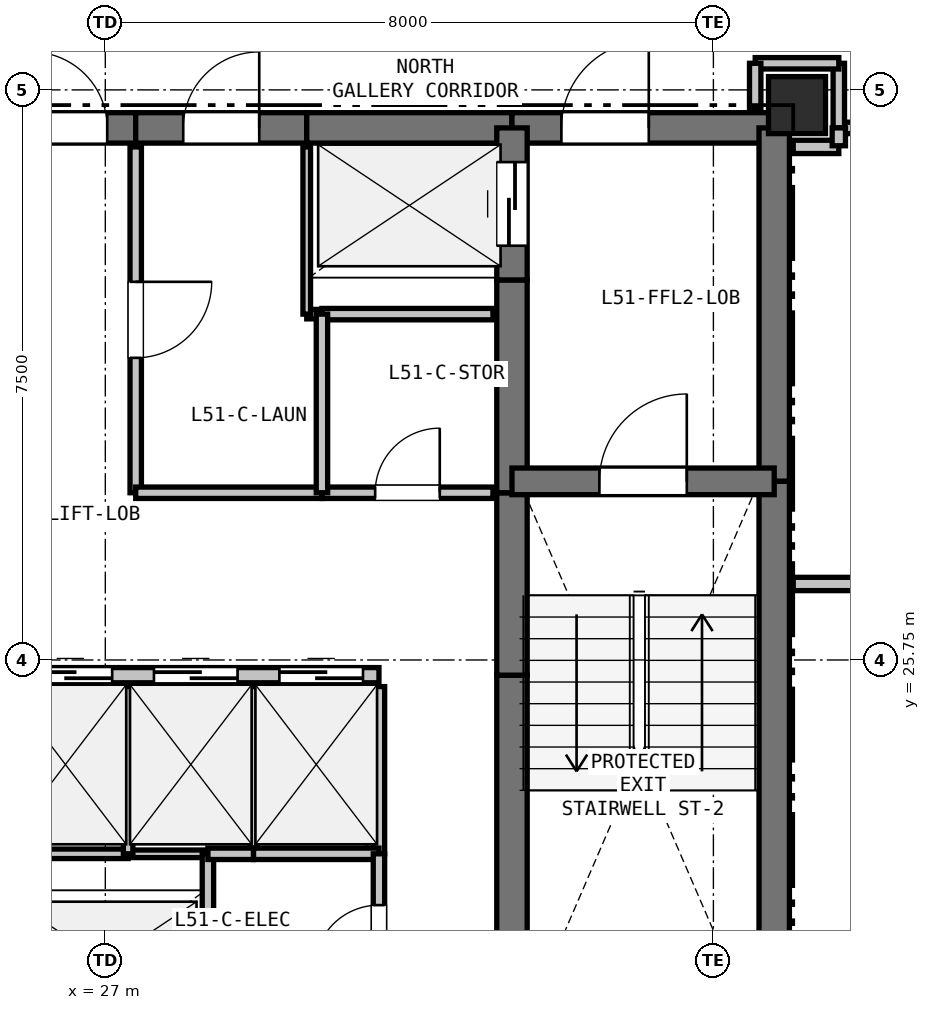
"""IFC4 building model, lengths in metres.
Left out: names, types, materials, properties, quantities, classifications, styles, units other than length and angle.
Written with IfcOpenShell. Run it as: python <this file> out.ifc"""

import sys

from ifc_helpers import new_model, si_unit, direction, frame, frame_2d, origin, origin_2d, place, context, subcontext, project, spatial, rectangle, extrude, element, fill, save


model = new_model("IFC4")
c1 = context("Model", 3, precision=1e-05, world=origin(), true_north=direction((0.0, 1.0)))
c2 = subcontext(c1, "Body", "Model", "MODEL_VIEW")
j1 = project(units=[si_unit("LENGTHUNIT", "METRE"), si_unit("PLANEANGLEUNIT", "RADIAN")], contexts=[c1])
p1 = place(None, origin())
s1 = spatial("IfcSite", under=j1, at=p1, CompositionType="ELEMENT")
p2 = place(p1, origin())
s2 = spatial("IfcBuilding", under=s1, at=p2, CompositionType="ELEMENT")
p3 = place(p2, frame((0.0, 0.0, 185.4)))
s3 = spatial("IfcBuildingStorey", under=s2, at=p3, CompositionType="ELEMENT", Elevation=185.4)
p4 = place(p3, frame((36.1, 33.05, 0.0), z_axis=(0.0, 0.0, 1.0), x_axis=(1.0, 0.0, 0.0)))
e1 = element("IfcColumn", 1, at=p4, inside=s3, PredefinedType="COLUMN", context=c2, shape_type="SweptSolid", body=[
    extrude(rectangle(XDim=0.75, YDim=0.75, at=origin_2d()), origin(), (0.0, 0.0, 1.0), 3.3),
])
p5 = place(p3, frame((25.65, 32.75, 0.0), z_axis=(0.0, 0.0, 1.0), x_axis=(1.0, 0.0, 0.0)))
e2 = element("IfcWall", 2, at=p5, inside=s3, PredefinedType="SHEAR", context=c2, shape_type="SweptSolid", body=[
    extrude(rectangle(XDim=1.75, YDim=0.4, at=frame_2d((0.875, 0.0))), origin(), (0.0, 0.0, 1.0), 3.07),
])
p6 = place(p5, frame((0.375, 0.0, 0.0)))
e3 = element("IfcOpeningElement", 3, at=p6, cuts=e2, PredefinedType="OPENING", context=c2, shape_type="SweptSolid", body=[
    extrude(rectangle(XDim=1.0, YDim=2.15, at=frame_2d((0.5, 1.075))), frame((0.0, 0.21, 0.0), z_axis=(0.0, -1.0, 0.0), x_axis=(1.0, 0.0, 0.0)), (0.0, 0.0, 1.0), 0.42),
])
p7 = place(p3, frame((27.4, 32.75, 0.0), z_axis=(0.0, 0.0, 1.0), x_axis=(1.0, 0.0, 0.0)))
e4 = element("IfcWall", 4, at=p7, inside=s3, PredefinedType="SHEAR", context=c2, shape_type="SweptSolid", body=[
    extrude(rectangle(XDim=2.25, YDim=0.4, at=frame_2d((1.125, 0.0))), origin(), (0.0, 0.0, 1.0), 3.07),
])
p8 = place(p7, frame((0.625, 0.0, 0.0)))
e5 = element("IfcOpeningElement", 5, at=p8, cuts=e4, PredefinedType="OPENING", context=c2, shape_type="SweptSolid", body=[
    extrude(rectangle(XDim=1.0, YDim=2.15, at=frame_2d((0.5, 1.075))), frame((0.0, 0.21, 0.0), z_axis=(0.0, -1.0, 0.0), x_axis=(1.0, 0.0, 0.0)), (0.0, 0.0, 1.0), 0.42),
])
p9 = place(p3, frame((29.65, 32.75, 0.0), z_axis=(0.0, 0.0, 1.0), x_axis=(1.0, 0.0, 0.0)))
e6 = element("IfcWall", 6, at=p9, inside=s3, PredefinedType="SHEAR", context=c2, shape_type="SweptSolid", body=[
    extrude(rectangle(XDim=2.7, YDim=0.4, at=frame_2d((1.35, 0.0))), origin(), (0.0, 0.0, 1.0), 3.07),
])
p10 = place(p3, frame((32.35, 32.75, 0.0), z_axis=(0.0, 0.0, 1.0), x_axis=(1.0, 0.0, 0.0)))
e7 = element("IfcWall", 7, at=p10, inside=s3, PredefinedType="SHEAR", context=c2, shape_type="SweptSolid", body=[
    extrude(rectangle(XDim=3.45, YDim=0.4, at=frame_2d((1.725, 0.0))), origin(), (0.0, 0.0, 1.0), 3.07),
])
p11 = place(p10, frame((0.65, 0.0, 0.0)))
e8 = element("IfcOpeningElement", 8, at=p11, cuts=e7, PredefinedType="OPENING", context=c2, shape_type="SweptSolid", body=[
    extrude(rectangle(XDim=1.15, YDim=2.15, at=frame_2d((0.575, 1.075))), frame((0.0, 0.21, 0.0), z_axis=(0.0, -1.0, 0.0), x_axis=(1.0, 0.0, 0.0)), (0.0, 0.0, 1.0), 0.42),
])
p12 = place(p3, frame((35.8, 32.75, 0.0), z_axis=(0.0, 0.0, 1.0), x_axis=(0.0, -1.0, 0.0)))
e9 = element("IfcWall", 9, at=p12, inside=s3, PredefinedType="SHEAR", context=c2, shape_type="SweptSolid", body=[
    extrude(rectangle(XDim=4.65, YDim=0.4, at=frame_2d((2.325, 0.0))), origin(), (0.0, 0.0, 1.0), 3.07),
])
p13 = place(p3, frame((35.8, 28.1, 0.0), z_axis=(0.0, 0.0, 1.0), x_axis=(0.0, -1.0, 0.0)))
e10 = element("IfcWall", 10, at=p13, inside=s3, PredefinedType="SHEAR", context=c2, shape_type="SweptSolid", body=[
    extrude(rectangle(XDim=7.35, YDim=0.4, at=frame_2d((3.675, 0.0))), origin(), (0.0, 0.0, 1.0), 3.07),
])
p14 = place(p3, frame((32.35, 20.75, 0.0), z_axis=(0.0, 0.0, 1.0), x_axis=(0.0, 1.0, 0.0)))
e11 = element("IfcWall", 11, at=p14, inside=s3, PredefinedType="SHEAR", context=c2, shape_type="SweptSolid", body=[
    extrude(rectangle(XDim=4.8, YDim=0.4, at=frame_2d((2.4, 0.0))), origin(), (0.0, 0.0, 1.0), 3.07),
])
p15 = place(p3, frame((32.35, 25.55, 0.0), z_axis=(0.0, 0.0, 1.0), x_axis=(0.0, 1.0, 0.0)))
e12 = element("IfcWall", 12, at=p15, inside=s3, PredefinedType="SHEAR", context=c2, shape_type="SweptSolid", body=[
    extrude(rectangle(XDim=2.4, YDim=0.4, at=frame_2d((1.2, 0.0))), origin(), (0.0, 0.0, 1.0), 3.07),
])
p16 = place(p3, frame((32.35, 27.95, 0.0), z_axis=(0.0, 0.0, 1.0), x_axis=(0.0, 1.0, 0.0)))
e13 = element("IfcWall", 13, at=p16, inside=s3, PredefinedType="SHEAR", context=c2, shape_type="SweptSolid", body=[
    extrude(rectangle(XDim=2.8, YDim=0.4, at=frame_2d((1.4, 0.0))), origin(), (0.0, 0.0, 1.0), 3.07),
])
p17 = place(p3, frame((32.35, 30.75, 0.0), z_axis=(0.0, 0.0, 1.0), x_axis=(0.0, 1.0, 0.0)))
e14 = element("IfcWall", 14, at=p17, inside=s3, PredefinedType="SHEAR", context=c2, shape_type="SweptSolid", body=[
    extrude(rectangle(XDim=2.0, YDim=0.4, at=frame_2d((1.0, 0.0))), origin(), (0.0, 0.0, 1.0), 3.07),
])
p18 = place(p17, frame((0.45, 0.0, 0.0)))
e15 = element("IfcOpeningElement", 15, at=p18, cuts=e14, PredefinedType="OPENING", context=c2, shape_type="SweptSolid", body=[
    extrude(rectangle(XDim=1.1, YDim=2.15, at=frame_2d((0.55, 1.075))), frame((0.0, 0.21, 0.0), z_axis=(0.0, -1.0, 0.0), x_axis=(1.0, 0.0, 0.0)), (0.0, 0.0, 1.0), 0.42),
])
p19 = place(p3, frame((32.35, 28.1, 0.0), z_axis=(0.0, 0.0, 1.0), x_axis=(1.0, 0.0, 0.0)))
e16 = element("IfcWall", 16, at=p19, inside=s3, PredefinedType="SHEAR", context=c2, shape_type="SweptSolid", body=[
    extrude(rectangle(XDim=3.45, YDim=0.35, at=frame_2d((1.725, 0.0))), origin(), (0.0, 0.0, 1.0), 3.07),
])
p20 = place(p19, frame((1.15, 0.0, 0.0)))
e17 = element("IfcOpeningElement", 17, at=p20, cuts=e16, PredefinedType="OPENING", context=c2, shape_type="SweptSolid", body=[
    extrude(rectangle(XDim=1.15, YDim=2.15, at=frame_2d((0.575, 1.075))), frame((0.0, 0.185, 0.0), z_axis=(0.0, -1.0, 0.0), x_axis=(1.0, 0.0, 0.0)), (0.0, 0.0, 1.0), 0.37),
])
p21 = place(p3, frame((25.65, 25.55, 0.0), z_axis=(0.0, 0.0, 1.0), x_axis=(1.0, 0.0, 0.0)))
e18 = element("IfcWall", 18, at=p21, inside=s3, PredefinedType="PARTITIONING", context=c2, shape_type="SweptSolid", body=[
    extrude(rectangle(XDim=4.95, YDim=0.2, at=frame_2d((2.475, 0.0))), origin(), (0.0, 0.0, 1.0), 3.07),
])
p22 = place(p21, frame((0.34, 0.0, 0.0)))
e19 = element("IfcOpeningElement", 19, at=p22, cuts=e18, PredefinedType="OPENING", context=c2, shape_type="SweptSolid", body=[
    extrude(rectangle(XDim=1.1, YDim=2.15, at=frame_2d((0.55, 1.075))), frame((0.0, 0.11, 0.0), z_axis=(0.0, -1.0, 0.0), x_axis=(1.0, 0.0, 0.0)), (0.0, 0.0, 1.0), 0.22),
])
p23 = place(p21, frame((1.99, 0.0, 0.0)))
e20 = element("IfcOpeningElement", 20, at=p23, cuts=e18, PredefinedType="OPENING", context=c2, shape_type="SweptSolid", body=[
    extrude(rectangle(XDim=1.1, YDim=2.15, at=frame_2d((0.55, 1.075))), frame((0.0, 0.11, 0.0), z_axis=(0.0, -1.0, 0.0), x_axis=(1.0, 0.0, 0.0)), (0.0, 0.0, 1.0), 0.22),
])
p24 = place(p21, frame((3.64, 0.0, 0.0)))
e21 = element("IfcOpeningElement", 21, at=p24, cuts=e18, PredefinedType="OPENING", context=c2, shape_type="SweptSolid", body=[
    extrude(rectangle(XDim=1.1, YDim=2.15, at=frame_2d((0.55, 1.075))), frame((0.0, 0.11, 0.0), z_axis=(0.0, -1.0, 0.0), x_axis=(1.0, 0.0, 0.0)), (0.0, 0.0, 1.0), 0.22),
])
p25 = place(p3, frame((25.9, 23.2, 0.0), z_axis=(0.0, 0.0, 1.0), x_axis=(1.0, 0.0, 0.0)))
e22 = element("IfcWall", 22, at=p25, inside=s3, PredefinedType="PARTITIONING", context=c2, shape_type="SweptSolid", body=[
    extrude(rectangle(XDim=1.4, YDim=0.125, at=frame_2d((0.7, 0.0))), origin(), (0.0, 0.0, 1.0), 3.07),
])
p26 = place(p3, frame((27.3, 23.2, 0.0), z_axis=(0.0, 0.0, 1.0), x_axis=(1.0, 0.0, 0.0)))
e23 = element("IfcWall", 23, at=p26, inside=s3, PredefinedType="PARTITIONING", context=c2, shape_type="SweptSolid", body=[
    extrude(rectangle(XDim=1.05, YDim=0.1, at=frame_2d((0.525, 0.0))), origin(), (0.0, 0.0, 1.0), 3.07),
])
p27 = place(p3, frame((28.35, 23.2, 0.0), z_axis=(0.0, 0.0, 1.0), x_axis=(0.0, -1.0, 0.0)))
e24 = element("IfcWall", 24, at=p27, inside=s3, PredefinedType="PARTITIONING", context=c2, shape_type="SweptSolid", body=[
    extrude(rectangle(XDim=2.2, YDim=0.15, at=frame_2d((1.1, 0.0))), origin(), (0.0, 0.0, 1.0), 3.07),
])
p28 = place(p3, frame((32.1, 30.3, 0.0), z_axis=(0.0, 0.0, 1.0), x_axis=(-1.0, 0.0, 0.0)))
e25 = element("IfcWall", 25, at=p28, inside=s3, PredefinedType="PARTITIONING", context=c2, shape_type="SweptSolid", body=[
    extrude(rectangle(XDim=2.25, YDim=0.15, at=frame_2d((1.125, 0.0))), origin(), (0.0, 0.0, 1.0), 3.07),
])
p29 = place(p3, frame((29.85, 30.3, 0.0), z_axis=(0.0, 0.0, 1.0), x_axis=(-1.0, 0.0, 0.0)))
e26 = element("IfcWall", 26, at=p29, inside=s3, PredefinedType="PARTITIONING", context=c2, shape_type="SweptSolid", body=[
    extrude(rectangle(XDim=0.2, YDim=0.125, at=frame_2d((0.1, 0.0))), origin(), (0.0, 0.0, 1.0), 3.07),
])
p30 = place(p3, frame((29.65, 30.3, 0.0), z_axis=(0.0, 0.0, 1.0), x_axis=(0.0, 1.0, 0.0)))
e27 = element("IfcWall", 27, at=p30, inside=s3, PredefinedType="PARTITIONING", context=c2, shape_type="SweptSolid", body=[
    extrude(rectangle(XDim=2.2, YDim=0.1, at=frame_2d((1.1, 0.0))), origin(), (0.0, 0.0, 1.0), 3.07),
])
p31 = place(p3, frame((27.3, 25.4, 0.0), z_axis=(0.0, 0.0, 1.0), x_axis=(0.0, -1.0, 0.0)))
e28 = element("IfcWall", 28, at=p31, inside=s3, PredefinedType="PARTITIONING", context=c2, shape_type="SweptSolid", body=[
    extrude(rectangle(XDim=2.2, YDim=0.125, at=frame_2d((1.1, 0.0))), origin(), (0.0, 0.0, 1.0), 3.07),
])
p32 = place(p3, frame((28.95, 25.4, 0.0), z_axis=(0.0, 0.0, 1.0), x_axis=(0.0, -1.0, 0.0)))
e29 = element("IfcWall", 29, at=p32, inside=s3, PredefinedType="PARTITIONING", context=c2, shape_type="SweptSolid", body=[
    extrude(rectangle(XDim=2.2, YDim=0.1, at=frame_2d((1.1, 0.0))), origin(), (0.0, 0.0, 1.0), 3.07),
])
p33 = place(p3, frame((28.95, 23.2, 0.0), z_axis=(0.0, 0.0, 1.0), x_axis=(-1.0, 0.0, 0.0)))
e30 = element("IfcWall", 30, at=p33, inside=s3, PredefinedType="PARTITIONING", context=c2, shape_type="SweptSolid", body=[
    extrude(rectangle(XDim=0.6, YDim=0.15, at=frame_2d((0.3, 0.0))), origin(), (0.0, 0.0, 1.0), 3.07),
])
p34 = place(p3, frame((30.6, 25.4, 0.0), z_axis=(0.0, 0.0, 1.0), x_axis=(0.0, -1.0, 0.0)))
e31 = element("IfcWall", 31, at=p34, inside=s3, PredefinedType="PARTITIONING", context=c2, shape_type="SweptSolid", body=[
    extrude(rectangle(XDim=2.2, YDim=0.15, at=frame_2d((1.1, 0.0))), origin(), (0.0, 0.0, 1.0), 3.07),
])
p35 = place(p3, frame((30.6, 23.2, 0.0), z_axis=(0.0, 0.0, 1.0), x_axis=(-1.0, 0.0, 0.0)))
e32 = element("IfcWall", 32, at=p35, inside=s3, PredefinedType="PARTITIONING", context=c2, shape_type="SweptSolid", body=[
    extrude(rectangle(XDim=1.65, YDim=0.15, at=frame_2d((0.825, 0.0))), origin(), (0.0, 0.0, 1.0), 3.07),
])
p36 = place(p3, frame((30.6, 21.0, 0.0), z_axis=(0.0, 0.0, 1.0), x_axis=(0.0, 1.0, 0.0)))
e33 = element("IfcWall", 33, at=p36, inside=s3, PredefinedType="PARTITIONING", context=c2, shape_type="SweptSolid", body=[
    extrude(rectangle(XDim=2.2, YDim=0.15, at=frame_2d((1.1, 0.0))), origin(), (0.0, 0.0, 1.0), 3.07),
])
p37 = place(p36, frame((0.675, 0.0, 0.0)))
e34 = element("IfcOpeningElement", 34, at=p37, cuts=e33, PredefinedType="OPENING", context=c2, shape_type="SweptSolid", body=[
    extrude(rectangle(XDim=0.85, YDim=2.1, at=frame_2d((0.425, 1.05))), frame((0.0, 0.085, 0.0), z_axis=(0.0, -1.0, 0.0), x_axis=(1.0, 0.0, 0.0)), (0.0, 0.0, 1.0), 0.17),
])
p38 = place(p3, frame((27.4, 32.5, 0.0), z_axis=(0.0, 0.0, 1.0), x_axis=(0.0, -1.0, 0.0)))
e35 = element("IfcWall", 35, at=p38, inside=s3, PredefinedType="PARTITIONING", context=c2, shape_type="SweptSolid", body=[
    extrude(rectangle(XDim=4.55, YDim=0.15, at=frame_2d((2.275, 0.0))), origin(), (0.0, 0.0, 1.0), 3.07),
])
p39 = place(p38, frame((1.775, 0.0, 0.0)))
e36 = element("IfcOpeningElement", 36, at=p39, cuts=e35, PredefinedType="OPENING", context=c2, shape_type="SweptSolid", body=[
    extrude(rectangle(XDim=1.0, YDim=2.15, at=frame_2d((0.5, 1.075))), frame((0.0, 0.085, 0.0), z_axis=(0.0, -1.0, 0.0), x_axis=(1.0, 0.0, 0.0)), (0.0, 0.0, 1.0), 0.17),
])
p40 = place(p3, frame((27.4, 27.95, 0.0), z_axis=(0.0, 0.0, 1.0), x_axis=(1.0, 0.0, 0.0)))
e37 = element("IfcWall", 37, at=p40, inside=s3, PredefinedType="PARTITIONING", context=c2, shape_type="SweptSolid", body=[
    extrude(rectangle(XDim=2.45, YDim=0.15, at=frame_2d((1.225, 0.0))), origin(), (0.0, 0.0, 1.0), 3.07),
])
p41 = place(p3, frame((29.85, 27.95, 0.0), z_axis=(0.0, 0.0, 1.0), x_axis=(1.0, 0.0, 0.0)))
e38 = element("IfcWall", 38, at=p41, inside=s3, PredefinedType="PARTITIONING", context=c2, shape_type="SweptSolid", body=[
    extrude(rectangle(XDim=2.25, YDim=0.15, at=frame_2d((1.125, 0.0))), origin(), (0.0, 0.0, 1.0), 3.07),
])
p42 = place(p41, frame((0.7, 0.0, 0.0)))
e39 = element("IfcOpeningElement", 39, at=p42, cuts=e38, PredefinedType="OPENING", context=c2, shape_type="SweptSolid", body=[
    extrude(rectangle(XDim=0.85, YDim=2.1, at=frame_2d((0.425, 1.05))), frame((0.0, 0.085, 0.0), z_axis=(0.0, -1.0, 0.0), x_axis=(1.0, 0.0, 0.0)), (0.0, 0.0, 1.0), 0.17),
])
p43 = place(p3, frame((39.2, 32.75, 0.0), z_axis=(0.0, 0.0, 1.0), x_axis=(-1.0, 0.0, 0.0)))
e40 = element("IfcWall", 40, at=p43, inside=s3, PredefinedType="PARTITIONING", context=c2, shape_type="SweptSolid", body=[
    extrude(rectangle(XDim=2.55, YDim=0.15, at=frame_2d((1.275, 0.0))), origin(), (0.0, 0.0, 1.0), 3.07),
])
p44 = place(p43, frame((0.85, 0.0, 0.0)))
e41 = element("IfcOpeningElement", 41, at=p44, cuts=e40, PredefinedType="OPENING", context=c2, shape_type="SweptSolid", body=[
    extrude(rectangle(XDim=0.85, YDim=2.1, at=frame_2d((0.425, 1.05))), frame((0.0, 0.085, 0.0), z_axis=(0.0, -1.0, 0.0), x_axis=(1.0, 0.0, 0.0)), (0.0, 0.0, 1.0), 0.17),
])
p45 = place(p3, frame((36.65, 32.75, 0.0), z_axis=(0.0, 0.0, 1.0), x_axis=(0.0, 1.0, 0.0)))
e42 = element("IfcWall", 42, at=p45, inside=s3, PredefinedType="PARTITIONING", context=c2, shape_type="SweptSolid", body=[
    extrude(rectangle(XDim=0.85, YDim=0.15, at=frame_2d((0.425, 0.0))), origin(), (0.0, 0.0, 1.0), 2.518),
])
p46 = place(p3, frame((36.65, 33.6, 0.0), z_axis=(0.0, 0.0, 1.0), x_axis=(-1.0, 0.0, 0.0)))
e43 = element("IfcWall", 43, at=p46, inside=s3, PredefinedType="PARTITIONING", context=c2, shape_type="SweptSolid", body=[
    extrude(rectangle(XDim=1.1, YDim=0.15, at=frame_2d((0.55, 0.0))), origin(), (0.0, 0.0, 1.0), 2.518),
])
p47 = place(p3, frame((35.55, 33.6, 0.0), z_axis=(0.0, 0.0, 1.0), x_axis=(0.0, -1.0, 0.0)))
e44 = element("IfcWall", 44, at=p47, inside=s3, PredefinedType="PARTITIONING", context=c2, shape_type="SweptSolid", body=[
    extrude(rectangle(XDim=0.6, YDim=0.15, at=frame_2d((0.3, 0.0))), origin(), (0.0, 0.0, 1.0), 2.595),
])
p48 = place(p3, frame((36.05, 32.5, 0.0), z_axis=(0.0, 0.0, 1.0), x_axis=(1.0, 0.0, 0.0)))
e45 = element("IfcWall", 45, at=p48, inside=s3, PredefinedType="PLUMBINGWALL", context=c2, shape_type="SweptSolid", body=[
    extrude(rectangle(XDim=0.6, YDim=0.175, at=frame_2d((0.3, 0.0))), origin(), (0.0, 0.0, 1.0), 2.595),
])
p49 = place(p3, frame((36.65, 32.515, 0.0), z_axis=(0.0, 0.0, 1.0), x_axis=(0.0, 1.0, 0.0)))
e46 = element("IfcWall", 46, at=p49, inside=s3, PredefinedType="PLUMBINGWALL", context=c2, shape_type="SweptSolid", body=[
    extrude(rectangle(XDim=0.235, YDim=0.175, at=frame_2d((0.118, 0.0))), origin(), (0.0, 0.0, 1.0), 3.07),
])
p50 = place(p3, frame((40.55, 26.75, 0.0), z_axis=(0.0, 0.0, 1.0), x_axis=(-1.0, 0.0, 0.0)))
e47 = element("IfcWall", 47, at=p50, inside=s3, PredefinedType="PLUMBINGWALL", context=c2, shape_type="SweptSolid", body=[
    extrude(rectangle(XDim=4.5, YDim=0.175, at=frame_2d((2.25, 0.0))), origin(), (0.0, 0.0, 1.0), 2.365),
])
p51 = place(p3, frame((29.85, 30.3, 0.0), z_axis=(0.0, 0.0, 1.0), x_axis=(0.0, -1.0, 0.0)))
e48 = element("IfcWall", 48, at=p51, inside=s3, PredefinedType="PARTITIONING", context=c2, shape_type="SweptSolid", body=[
    extrude(rectangle(XDim=2.35, YDim=0.15, at=frame_2d((1.175, 0.0))), origin(), (0.0, 0.0, 1.0), 3.07),
])
p52 = place(p22, origin())
e49 = element("IfcDoor", 49, at=p52, inside=s3, OperationType="SLIDING_TO_LEFT", PredefinedType="DOOR", context=c2, shape_type="SweptSolid", body=[
    extrude(rectangle(XDim=1.1, YDim=2.15, at=frame_2d((0.55, 1.075))), frame((0.0, 0.025, 0.0), z_axis=(0.0, -1.0, 0.0), x_axis=(1.0, 0.0, 0.0)), (0.0, 0.0, 1.0), 0.05),
])
fill(e19, e49)
p53 = place(p23, origin())
e50 = element("IfcDoor", 50, at=p53, inside=s3, OperationType="SLIDING_TO_LEFT", PredefinedType="DOOR", context=c2, shape_type="SweptSolid", body=[
    extrude(rectangle(XDim=1.1, YDim=2.15, at=frame_2d((0.55, 1.075))), frame((0.0, 0.025, 0.0), z_axis=(0.0, -1.0, 0.0), x_axis=(1.0, 0.0, 0.0)), (0.0, 0.0, 1.0), 0.05),
])
fill(e20, e50)
p54 = place(p24, origin())
e51 = element("IfcDoor", 51, at=p54, inside=s3, OperationType="SLIDING_TO_LEFT", PredefinedType="DOOR", context=c2, shape_type="SweptSolid", body=[
    extrude(rectangle(XDim=1.1, YDim=2.15, at=frame_2d((0.55, 1.075))), frame((0.0, 0.025, 0.0), z_axis=(0.0, -1.0, 0.0), x_axis=(1.0, 0.0, 0.0)), (0.0, 0.0, 1.0), 0.05),
])
fill(e21, e51)
p55 = place(p6, origin())
e52 = element("IfcDoor", 52, at=p55, inside=s3, OperationType="SINGLE_SWING_LEFT", PredefinedType="DOOR", context=c2, shape_type="SweptSolid", body=[
    extrude(rectangle(XDim=1.0, YDim=2.15, at=frame_2d((0.5, 1.075))), frame((0.0, 0.025, 0.0), z_axis=(0.0, -1.0, 0.0), x_axis=(1.0, 0.0, 0.0)), (0.0, 0.0, 1.0), 0.05),
])
fill(e3, e52)
p56 = place(p18, origin())
e53 = element("IfcDoor", 53, at=p56, inside=s3, OperationType="SLIDING_TO_LEFT", PredefinedType="DOOR", context=c2, shape_type="SweptSolid", body=[
    extrude(rectangle(XDim=1.1, YDim=2.15, at=frame_2d((0.55, 1.075))), frame((0.0, 0.025, 0.0), z_axis=(0.0, -1.0, 0.0), x_axis=(1.0, 0.0, 0.0)), (0.0, 0.0, 1.0), 0.05),
])
fill(e15, e53)
p57 = place(p20, origin())
e54 = element("IfcDoor", 54, at=p57, inside=s3, OperationType="SINGLE_SWING_RIGHT", PredefinedType="DOOR", context=c2, shape_type="SweptSolid", body=[
    extrude(rectangle(XDim=1.15, YDim=2.15, at=frame_2d((0.575, 1.075))), frame((0.0, 0.025, 0.0), z_axis=(0.0, -1.0, 0.0), x_axis=(1.0, 0.0, 0.0)), (0.0, 0.0, 1.0), 0.05),
])
fill(e17, e54)
p58 = place(p11, origin())
e55 = element("IfcDoor", 55, at=p58, inside=s3, OperationType="SINGLE_SWING_RIGHT", PredefinedType="DOOR", context=c2, shape_type="SweptSolid", body=[
    extrude(rectangle(XDim=1.15, YDim=2.15, at=frame_2d((0.575, 1.075))), frame((0.0, 0.025, 0.0), z_axis=(0.0, -1.0, 0.0), x_axis=(1.0, 0.0, 0.0)), (0.0, 0.0, 1.0), 0.05),
])
fill(e8, e55)
p59 = place(p39, origin())
e56 = element("IfcDoor", 56, at=p59, inside=s3, OperationType="SINGLE_SWING_LEFT", PredefinedType="DOOR", context=c2, shape_type="SweptSolid", body=[
    extrude(rectangle(XDim=1.0, YDim=2.15, at=frame_2d((0.5, 1.075))), frame((0.0, 0.025, 0.0), z_axis=(0.0, -1.0, 0.0), x_axis=(1.0, 0.0, 0.0)), (0.0, 0.0, 1.0), 0.05),
])
fill(e36, e56)
p60 = place(p42, origin())
e57 = element("IfcDoor", 57, at=p60, inside=s3, OperationType="SINGLE_SWING_RIGHT", PredefinedType="DOOR", context=c2, shape_type="SweptSolid", body=[
    extrude(rectangle(XDim=0.85, YDim=2.1, at=frame_2d((0.425, 1.05))), frame((0.0, 0.025, 0.0), z_axis=(0.0, -1.0, 0.0), x_axis=(1.0, 0.0, 0.0)), (0.0, 0.0, 1.0), 0.05),
])
fill(e39, e57)
p61 = place(p37, origin())
e58 = element("IfcDoor", 58, at=p61, inside=s3, OperationType="SINGLE_SWING_LEFT", PredefinedType="DOOR", context=c2, shape_type="SweptSolid", body=[
    extrude(rectangle(XDim=0.85, YDim=2.1, at=frame_2d((0.425, 1.05))), frame((0.0, 0.025, 0.0), z_axis=(0.0, -1.0, 0.0), x_axis=(1.0, 0.0, 0.0)), (0.0, 0.0, 1.0), 0.05),
])
fill(e34, e58)
p62 = place(p8, origin())
e59 = element("IfcDoor", 59, at=p62, inside=s3, OperationType="SINGLE_SWING_RIGHT", PredefinedType="DOOR", context=c2, shape_type="SweptSolid", body=[
    extrude(rectangle(XDim=1.0, YDim=2.15, at=frame_2d((0.5, 1.075))), frame((0.0, 0.025, 0.0), z_axis=(0.0, -1.0, 0.0), x_axis=(1.0, 0.0, 0.0)), (0.0, 0.0, 1.0), 0.05),
])
fill(e5, e59)
save(model, sys.argv[1])
